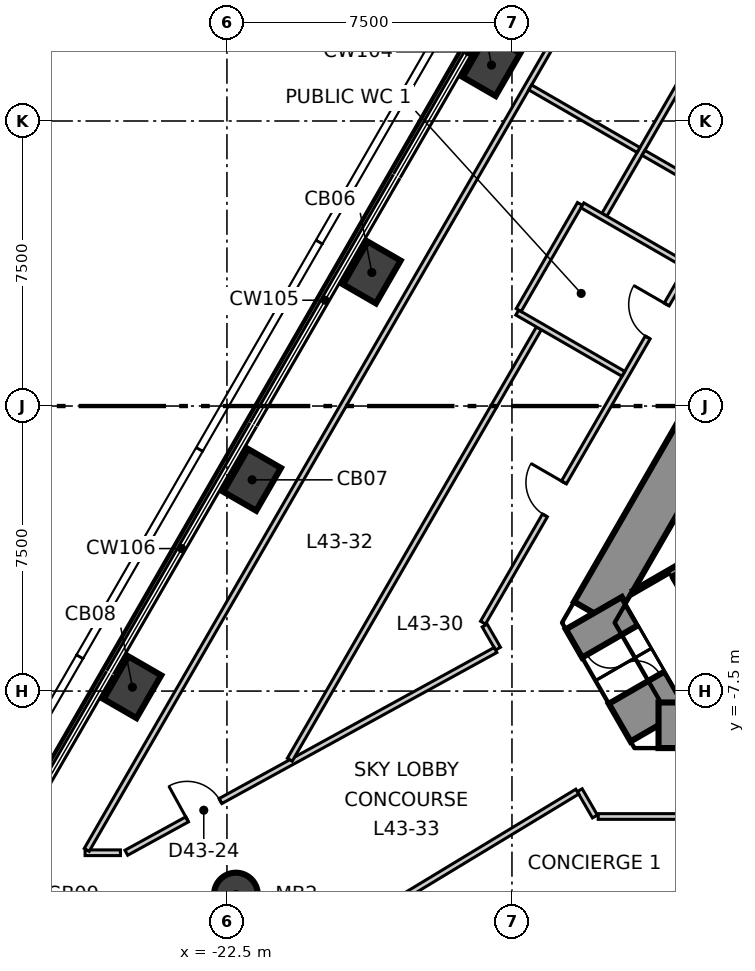
"""IFC4 building model, lengths in metres.
Left out: names, types, materials, properties, quantities, classifications, styles, units other than length and angle.
Written with IfcOpenShell. Run it as: python <this file> out.ifc"""

import sys

from ifc_helpers import new_model, si_unit, direction, frame, frame_2d, origin, origin_2d, place, context, subcontext, project, spatial, polyline, rectangle, circle, outline, extrude, element, fill, save


model = new_model("IFC4")
c1 = context("Model", 3, precision=1e-05, world=origin(), true_north=direction((0.0, 1.0)))
c2 = subcontext(c1, "Body", "Model", "MODEL_VIEW")
j1 = project(units=[si_unit("LENGTHUNIT", "METRE"), si_unit("PLANEANGLEUNIT", "RADIAN")], contexts=[c1])
p1 = place(None, origin())
s1 = spatial("IfcSite", under=j1, at=p1, CompositionType="ELEMENT")
p2 = place(p1, origin())
s2 = spatial("IfcBuilding", under=s1, at=p2, CompositionType="ELEMENT")
p3 = place(p2, frame((0.0, 0.0, 185.3)))
s3 = spatial("IfcBuildingStorey", under=s2, at=p3, CompositionType="ELEMENT", Elevation=185.3)
p4 = place(p3, frame((-1.703, 13.85, -0.6), z_axis=(0.0, 0.0, 1.0), x_axis=(-0.500005991004, -0.866021944849, 0.0)))
e1 = element("IfcWall", 1, at=p4, inside=s3, PredefinedType="SHEAR", context=c2, shape_type="SweptSolid", body=[
    extrude(outline(polyline([(-0.635, -0.6), (1.328, -0.6), (3.291, -0.6), (5.254, -0.6), (7.217, -0.6), (9.18, -0.6), (11.143, -0.6), (13.106, -0.6), (15.069, -0.6), (17.032, -0.6), (18.995, -0.6), (20.958, -0.6), (22.921, -0.6), (21.651, 0.6), (19.74, 0.6), (17.83, 0.6), (15.919, 0.6), (14.009, 0.6), (12.098, 0.6), (10.188, 0.6), (8.277, 0.6), (6.367, 0.6), (4.456, 0.6), (2.546, 0.6), (0.635, 0.6), (-0.635, -0.6)])), origin(), (0.0, 0.0, 1.0), 6.3),
])
p5 = place(p4, frame((10.881, 0.0, 0.6)))
e2 = element("IfcOpeningElement", 2, at=p5, cuts=e1, PredefinedType="OPENING", context=c2, shape_type="SweptSolid", body=[
    extrude(rectangle(XDim=1.1, YDim=2.1, at=frame_2d((0.55, 1.05))), frame((0.0, 0.61, 0.0), z_axis=(0.0, -1.0, 0.0), x_axis=(1.0, 0.0, 0.0)), (0.0, 0.0, 1.0), 1.22),
])
p6 = place(p4, frame((4.407, 0.0, 0.6)))
e3 = element("IfcOpeningElement", 3, at=p6, cuts=e1, PredefinedType="OPENING", context=c2, shape_type="SweptSolid", body=[
    extrude(rectangle(XDim=1.0, YDim=2.1, at=frame_2d((0.5, 1.05))), frame((0.0, 0.61, 0.0), z_axis=(0.0, -1.0, 0.0), x_axis=(1.0, 0.0, 0.0)), (0.0, 0.0, 1.0), 1.22),
])
p7 = place(p3, frame((-12.846, -5.45, -0.6), z_axis=(0.0, 0.0, 1.0), x_axis=(0.499939613464, -0.86606026516, 0.0)))
e4 = element("IfcWall", 4, at=p7, inside=s3, PredefinedType="SHEAR", context=c2, shape_type="SweptSolid", body=[
    extrude(outline(polyline([(-0.202, -0.85), (1.703, -0.85), (3.608, -0.85), (3.204, 0.85), (1.703, 0.85), (0.202, 0.85), (-0.202, -0.85)])), origin(), (0.0, 0.0, 1.0), 6.3),
])
p8 = place(p7, frame((0.859, 0.0, 0.6)))
e5 = element("IfcOpeningElement", 5, at=p8, cuts=e4, PredefinedType="OPENING", context=c2, shape_type="SweptSolid", body=[
    extrude(rectangle(XDim=1.4, YDim=2.1, at=frame_2d((0.7, 1.05))), frame((0.0, 0.86, 0.0), z_axis=(0.0, -1.0, 0.0), x_axis=(1.0, 0.0, 0.0)), (0.0, 0.0, 1.0), 1.72),
])
p9 = place(p3, frame((-11.143, -8.4, -0.6), z_axis=(0.0, 0.0, 1.0), x_axis=(1.0, 0.0, 0.0)))
e6 = element("IfcWall", 6, at=p9, inside=s3, PredefinedType="SHEAR", context=c2, shape_type="SweptSolid", body=[
    extrude(outline(polyline([(-0.635, -0.6), (1.328, -0.6), (3.291, -0.6), (5.254, -0.6), (7.217, -0.6), (9.18, -0.6), (11.143, -0.6), (13.106, -0.6), (15.069, -0.6), (17.032, -0.6), (18.995, -0.6), (20.958, -0.6), (22.921, -0.6), (21.651, 0.6), (19.74, 0.6), (17.83, 0.6), (15.919, 0.6), (14.009, 0.6), (12.098, 0.6), (10.188, 0.6), (8.277, 0.6), (6.367, 0.6), (4.456, 0.6), (2.546, 0.6), (0.635, 0.6), (-0.635, -0.6)])), origin(), (0.0, 0.0, 1.0), 6.3),
])
p10 = place(p9, frame((17.002, 0.0, 0.6)))
e7 = element("IfcOpeningElement", 7, at=p10, cuts=e6, PredefinedType="OPENING", context=c2, shape_type="SweptSolid", body=[
    extrude(rectangle(XDim=0.9, YDim=2.1, at=frame_2d((0.45, 1.05))), frame((0.0, 0.61, 0.0), z_axis=(0.0, -1.0, 0.0), x_axis=(1.0, 0.0, 0.0)), (0.0, 0.0, 1.0), 1.22),
])
for number, where, z_axis, x_axis in (
    (8, (-15.538, 8.971, -0.6), (0.0, 0.0, 1.0), (0.5, 0.866, 0.0)),
    (9, (-18.688, 3.514, -0.6), (0.0, 0.0, 1.0), (0.5, 0.866, 0.0)),
    (10, (-21.838, -1.942, -0.6), (0.0, 0.0, 1.0), (0.5, 0.866, 0.0)),
    (11, (-24.988, -7.398, -0.6), (0.0, 0.0, 1.0), (0.5, 0.866, 0.0)),
):
    element("IfcColumn", number, at=place(p3, frame(where, z_axis=z_axis, x_axis=x_axis)), inside=s3, PredefinedType="COLUMN", context=c2, shape_type="SweptSolid", body=[
        extrude(rectangle(XDim=1.3, YDim=1.0, at=origin_2d()), origin(), (0.0, 0.0, 1.0), 6.3),
    ])
p11 = place(p3, frame((-22.264, -12.854, -0.6), z_axis=(0.0, 0.0, 1.0), x_axis=(1.0, 0.0, 0.0)))
e12 = element("IfcColumn", 12, at=p11, inside=s3, PredefinedType="COLUMN", context=c2, shape_type="SweptSolid", body=[
    extrude(circle(Radius=0.575, at=origin_2d()), origin(), (0.0, 0.0, 1.0), 6.3),
])
p12 = place(p3, frame((-15.762, -5.7, 0.0), z_axis=(0.0, 0.0, 1.0), x_axis=(0.500025268852, 0.866010814314, 0.0)))
e13 = element("IfcWall", 13, at=p12, inside=s3, PredefinedType="PARTITIONING", context=c2, shape_type="SweptSolid", body=[
    extrude(rectangle(XDim=10.817, YDim=0.15, at=frame_2d((5.409, 0.0))), origin(), (0.0, 0.0, 1.0), 5.7),
])
p13 = place(p12, frame((8.667, 0.0, 0.0)))
e14 = element("IfcOpeningElement", 14, at=p13, cuts=e13, PredefinedType="OPENING", context=c2, shape_type="SweptSolid", body=[
    extrude(rectangle(XDim=1.0, YDim=2.1, at=frame_2d((0.5, 1.05))), frame((0.0, 0.085, 0.0), z_axis=(0.0, -1.0, 0.0), x_axis=(1.0, 0.0, 0.0)), (0.0, 0.0, 1.0), 0.17),
])
p14 = place(p12, frame((3.259, 0.0, 0.0)))
e15 = element("IfcOpeningElement", 15, at=p14, cuts=e13, PredefinedType="OPENING", context=c2, shape_type="SweptSolid", body=[
    extrude(rectangle(XDim=1.0, YDim=2.1, at=frame_2d((0.5, 1.05))), frame((0.0, 0.085, 0.0), z_axis=(0.0, -1.0, 0.0), x_axis=(1.0, 0.0, 0.0)), (0.0, 0.0, 1.0), 0.17),
])
p15 = place(p3, frame((-15.718, -5.775, 0.0), z_axis=(0.0, 0.0, 1.0), x_axis=(0.499351643437, -0.866399409162, 0.0)))
e16 = element("IfcWall", 16, at=p15, inside=s3, PredefinedType="PARTITIONING", context=c2, shape_type="SweptSolid", body=[
    extrude(rectangle(XDim=0.703, YDim=0.15, at=frame_2d((0.352, 0.0))), origin(), (0.0, 0.0, 1.0), 5.7),
])
p16 = place(p3, frame((-13.217, -10.108, 0.0), z_axis=(0.0, 0.0, 1.0), x_axis=(0.500506525424, -0.865732763622, 0.0)))
e17 = element("IfcWall", 17, at=p16, inside=s3, PredefinedType="PARTITIONING", context=c2, shape_type="SweptSolid", body=[
    extrude(rectangle(XDim=0.8, YDim=0.15, at=frame_2d((0.4, 0.0))), origin(), (0.0, 0.0, 1.0), 5.7),
])
p17 = place(p3, frame((-25.148, -11.754, 0.0), z_axis=(0.0, 0.0, 1.0), x_axis=(0.876565430859, 0.481282708419, 0.0)))
e18 = element("IfcWall", 18, at=p17, inside=s3, PredefinedType="PARTITIONING", context=c2, shape_type="SweptSolid", body=[
    extrude(rectangle(XDim=11.083, YDim=0.15, at=frame_2d((5.542, 0.0))), origin(), (0.0, 0.0, 1.0), 5.0),
])
p18 = place(p17, frame((1.825, 0.0, 0.0)))
e19 = element("IfcOpeningElement", 19, at=p18, cuts=e18, PredefinedType="OPENING", context=c2, shape_type="SweptSolid", body=[
    extrude(rectangle(XDim=1.0, YDim=2.1, at=frame_2d((0.5, 1.05))), frame((0.0, 0.085, 0.0), z_axis=(0.0, -1.0, 0.0), x_axis=(1.0, 0.0, 0.0)), (0.0, 0.0, 1.0), 0.17),
])
p19 = place(p3, frame((-20.846, -9.307, 0.0), z_axis=(0.0, 0.0, 1.0), x_axis=(0.499999225185, 0.866025851124, 0.0)))
e20 = element("IfcWall", 20, at=p19, inside=s3, PredefinedType="PARTITIONING", context=c2, shape_type="SweptSolid", body=[
    extrude(rectangle(XDim=13.108, YDim=0.15, at=frame_2d((6.554, 0.0))), origin(), (0.0, 0.0, 1.0), 5.7),
])
p20 = place(p3, frame((-12.567, 5.033, 0.0), z_axis=(0.0, 0.0, 1.0), x_axis=(0.499999287049, 0.866025815407, 0.0)))
e21 = element("IfcWall", 21, at=p20, inside=s3, PredefinedType="PARTITIONING", context=c2, shape_type="SweptSolid", body=[
    extrude(rectangle(XDim=20.434, YDim=0.15, at=frame_2d((10.217, 0.0))), origin(), (0.0, 0.0, 1.0), 5.7),
])
p21 = place(p3, frame((-26.233, -11.754, 0.0), z_axis=(0.0, 0.0, 1.0), x_axis=(1.0, 0.0, 0.0)))
e22 = element("IfcWall", 22, at=p21, inside=s3, PredefinedType="PARTITIONING", context=c2, shape_type="SweptSolid", body=[
    extrude(rectangle(XDim=0.93, YDim=0.15, at=frame_2d((0.465, 0.0))), origin(), (0.0, 0.0, 1.0), 5.7),
])
p22 = place(p3, frame((-26.19, -11.679, 0.0), z_axis=(0.0, 0.0, 1.0), x_axis=(0.500012382508, 0.866018254622, 0.0)))
e23 = element("IfcWall", 23, at=p22, inside=s3, PredefinedType="PARTITIONING", context=c2, shape_type="SweptSolid", body=[
    extrude(rectangle(XDim=46.505, YDim=0.15, at=frame_2d((23.252, 0.0))), origin(), (0.0, 0.0, 1.0), 5.7),
])
p23 = place(p3, frame((-22.737, -15.872, 0.0), z_axis=(0.0, 0.0, 1.0), x_axis=(0.85539296063, 0.517979616302, 0.0)))
e24 = element("IfcWall", 24, at=p23, inside=s3, PredefinedType="PARTITIONING", context=c2, shape_type="SweptSolid", body=[
    extrude(rectangle(XDim=11.055, YDim=0.15, at=frame_2d((5.527, 0.0))), origin(), (0.0, 0.0, 1.0), 5.0),
])
p24 = place(p23, frame((1.2, 0.0, 0.0)))
e25 = element("IfcOpeningElement", 25, at=p24, cuts=e24, PredefinedType="OPENING", context=c2, shape_type="SweptSolid", body=[
    extrude(rectangle(XDim=2.4, YDim=2.1, at=frame_2d((1.2, 1.05))), frame((0.0, 0.085, 0.0), z_axis=(0.0, -1.0, 0.0), x_axis=(1.0, 0.0, 0.0)), (0.0, 0.0, 1.0), 0.17),
])
p25 = place(p3, frame((-12.731, -10.8, 0.0), z_axis=(0.0, 0.0, 1.0), x_axis=(1.0, 0.0, 0.0)))
e26 = element("IfcWall", 26, at=p25, inside=s3, PredefinedType="PARTITIONING", context=c2, shape_type="SweptSolid", body=[
    extrude(rectangle(XDim=25.548, YDim=0.15, at=frame_2d((12.774, 0.0))), origin(), (0.0, 0.0, 1.0), 5.7),
])
p26 = place(p25, frame((12.231, 0.0, 0.0)))
e27 = element("IfcOpeningElement", 27, at=p26, cuts=e26, PredefinedType="OPENING", context=c2, shape_type="SweptSolid", body=[
    extrude(rectangle(XDim=1.0, YDim=2.1, at=frame_2d((0.5, 1.05))), frame((0.0, 0.085, 0.0), z_axis=(0.0, -1.0, 0.0), x_axis=(1.0, 0.0, 0.0)), (0.0, 0.0, 1.0), 0.17),
])
p27 = place(p25, frame((4.997, 0.0, 0.0)))
e28 = element("IfcOpeningElement", 28, at=p27, cuts=e26, PredefinedType="OPENING", context=c2, shape_type="SweptSolid", body=[
    extrude(rectangle(XDim=1.0, YDim=2.1, at=frame_2d((0.5, 1.05))), frame((0.0, 0.085, 0.0), z_axis=(0.0, -1.0, 0.0), x_axis=(1.0, 0.0, 0.0)), (0.0, 0.0, 1.0), 0.17),
])
p28 = place(p25, frame((19.065, 0.0, 0.0)))
e29 = element("IfcOpeningElement", 29, at=p28, cuts=e26, PredefinedType="OPENING", context=c2, shape_type="SweptSolid", body=[
    extrude(rectangle(XDim=1.8, YDim=2.1, at=frame_2d((0.9, 1.05))), frame((0.0, 0.085, 0.0), z_axis=(0.0, -1.0, 0.0), x_axis=(1.0, 0.0, 0.0)), (0.0, 0.0, 1.0), 0.17),
])
p29 = place(p3, frame((-14.52, 8.383, 0.0), z_axis=(0.0, 0.0, 1.0), x_axis=(0.865960739811, -0.500111984565, 0.0)))
e30 = element("IfcWall", 30, at=p29, inside=s3, PredefinedType="PARTITIONING", context=c2, shape_type="SweptSolid", body=[
    extrude(rectangle(XDim=3.291, YDim=0.15, at=frame_2d((1.646, 0.0))), origin(), (0.0, 0.0, 1.0), 5.2),
])
p30 = place(p3, frame((-11.54, 6.662, 0.0), z_axis=(0.0, 0.0, 1.0), x_axis=(0.8660395779, -0.499975448907, 0.0)))
e31 = element("IfcWall", 31, at=p30, inside=s3, PredefinedType="PARTITIONING", context=c2, shape_type="SweptSolid", body=[
    extrude(rectangle(XDim=2.45, YDim=0.15, at=frame_2d((1.225, 0.0))), origin(), (0.0, 0.0, 1.0), 5.2),
])
p31 = place(p3, frame((-14.861, 2.46, 0.0), z_axis=(0.0, 0.0, 1.0), x_axis=(0.866087259513, -0.499892847427, 0.0)))
e32 = element("IfcWall", 32, at=p31, inside=s3, PredefinedType="PARTITIONING", context=c2, shape_type="SweptSolid", body=[
    extrude(rectangle(XDim=3.225, YDim=0.15, at=frame_2d((1.612, 0.0))), origin(), (0.0, 0.0, 1.0), 5.7),
])
p32 = place(p3, frame((-14.823, 2.525, 0.0), z_axis=(0.0, 0.0, 1.0), x_axis=(0.499860071841, 0.866106176273, 0.0)))
e33 = element("IfcWall", 33, at=p32, inside=s3, PredefinedType="PARTITIONING", context=c2, shape_type="SweptSolid", body=[
    extrude(rectangle(XDim=3.225, YDim=0.15, at=frame_2d((1.613, 0.0))), origin(), (0.0, 0.0, 1.0), 5.7),
])
p33 = place(p3, frame((-13.146, 5.28, 0.0), z_axis=(0.0, 0.0, 1.0), x_axis=(0.866035871367, -0.499981869177, 0.0)))
e34 = element("IfcWall", 34, at=p33, inside=s3, PredefinedType="PARTITIONING", context=c2, shape_type="SweptSolid", body=[
    extrude(rectangle(XDim=3.15, YDim=0.15, at=frame_2d((1.575, 0.0))), origin(), (0.0, 0.0, 1.0), 5.7),
])
p34 = place(p3, frame((-11.76, -4.942, 0.0), z_axis=(0.0, 0.0, 1.0), x_axis=(0.866048276411, 0.499960381356, 0.0)))
e35 = element("IfcWall", 35, at=p34, inside=s3, PredefinedType="SOLIDWALL", context=c2, shape_type="SweptSolid", body=[
    extrude(rectangle(XDim=6.04, YDim=0.2, at=frame_2d((3.02, 0.0))), origin(), (0.0, 0.0, 1.0), 5.7),
])
p35 = place(p13, origin())
e36 = element("IfcDoor", 36, at=p35, inside=s3, OperationType="SINGLE_SWING_LEFT", PredefinedType="DOOR", context=c2, shape_type="SweptSolid", body=[
    extrude(rectangle(XDim=1.0, YDim=2.1, at=frame_2d((0.5, 1.05))), frame((0.0, 0.025, 0.0), z_axis=(0.0, -1.0, 0.0), x_axis=(1.0, 0.0, 0.0)), (0.0, 0.0, 1.0), 0.05),
])
fill(e14, e36)
p36 = place(p14, origin())
e37 = element("IfcDoor", 37, at=p36, inside=s3, OperationType="SINGLE_SWING_LEFT", PredefinedType="DOOR", context=c2, shape_type="SweptSolid", body=[
    extrude(rectangle(XDim=1.0, YDim=2.1, at=frame_2d((0.5, 1.05))), frame((0.0, 0.025, 0.0), z_axis=(0.0, -1.0, 0.0), x_axis=(1.0, 0.0, 0.0)), (0.0, 0.0, 1.0), 0.05),
])
fill(e15, e37)
p37 = place(p18, origin())
e38 = element("IfcDoor", 38, at=p37, inside=s3, OperationType="SINGLE_SWING_RIGHT", PredefinedType="DOOR", context=c2, shape_type="SweptSolid", body=[
    extrude(rectangle(XDim=1.0, YDim=2.1, at=frame_2d((0.5, 1.05))), frame((0.0, 0.025, 0.0), z_axis=(0.0, -1.0, 0.0), x_axis=(1.0, 0.0, 0.0)), (0.0, 0.0, 1.0), 0.05),
])
fill(e19, e38)
p38 = place(p8, origin())
e39 = element("IfcDoor", 39, at=p38, inside=s3, OperationType="DOUBLE_DOOR_SINGLE_SWING", PredefinedType="DOOR", context=c2, shape_type="SweptSolid", body=[
    extrude(rectangle(XDim=1.4, YDim=2.1, at=frame_2d((0.7, 1.05))), frame((0.0, 0.025, 0.0), z_axis=(0.0, -1.0, 0.0), x_axis=(1.0, 0.0, 0.0)), (0.0, 0.0, 1.0), 0.05),
])
fill(e5, e39)
save(model, sys.argv[1])
